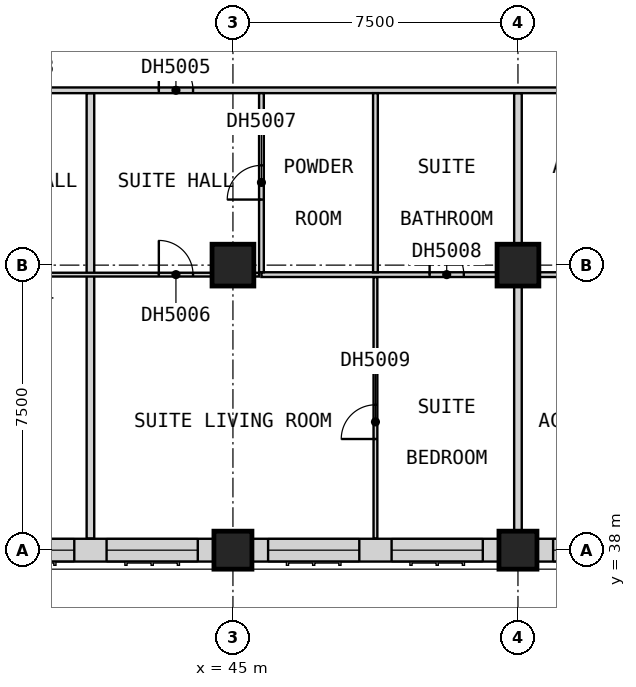
"""IFC4 building model, lengths in metres.
Left out: names, types, materials, properties, quantities, classifications, styles, units other than length and angle.
Written with IfcOpenShell. Run it as: python <this file> out.ifc"""

import sys

from ifc_helpers import new_model, si_unit, direction, frame, frame_2d, origin, origin_2d, place, context, subcontext, project, spatial, rectangle, extrude, element, fill, save


model = new_model("IFC4")
c1 = context("Model", 3, precision=1e-05, world=origin(), true_north=direction((0.0, 1.0)))
c2 = subcontext(c1, "Body", "Model", "MODEL_VIEW")
j1 = project(units=[si_unit("LENGTHUNIT", "METRE"), si_unit("PLANEANGLEUNIT", "RADIAN")], contexts=[c1])
p1 = place(None, origin())
s1 = spatial("IfcSite", under=j1, at=p1, CompositionType="ELEMENT")
p2 = place(p1, origin())
s2 = spatial("IfcBuilding", under=s1, at=p2, CompositionType="ELEMENT")
p3 = place(p2, frame((0.0, 0.0, 93.5)))
s3 = spatial("IfcBuildingStorey", under=s2, at=p3, CompositionType="ELEMENT", Elevation=93.5)
p4 = place(p3, frame((45.0, 38.0, 0.0), z_axis=(0.0, 0.0, 1.0), x_axis=(1.0, 0.0, 0.0)))
e1 = element("IfcColumn", 1, at=p4, inside=s3, PredefinedType="COLUMN", context=c2, shape_type="SweptSolid", body=[
    extrude(rectangle(XDim=1.0, YDim=1.0, at=origin_2d()), origin(), (0.0, 0.0, 1.0), 3.6),
])
p5 = place(p3, frame((45.0, 45.5, 0.0), z_axis=(0.0, 0.0, 1.0), x_axis=(1.0, 0.0, 0.0)))
e2 = element("IfcColumn", 2, at=p5, inside=s3, PredefinedType="COLUMN", context=c2, shape_type="SweptSolid", body=[
    extrude(rectangle(XDim=1.1, YDim=1.1, at=origin_2d()), origin(), (0.0, 0.0, 1.0), 3.6),
])
p6 = place(p3, frame((52.5, 38.0, 0.0), z_axis=(0.0, 0.0, 1.0), x_axis=(1.0, 0.0, 0.0)))
e3 = element("IfcColumn", 3, at=p6, inside=s3, PredefinedType="COLUMN", context=c2, shape_type="SweptSolid", body=[
    extrude(rectangle(XDim=1.0, YDim=1.0, at=origin_2d()), origin(), (0.0, 0.0, 1.0), 3.6),
])
p7 = place(p3, frame((52.5, 45.5, 0.0), z_axis=(0.0, 0.0, 1.0), x_axis=(1.0, 0.0, 0.0)))
e4 = element("IfcColumn", 4, at=p7, inside=s3, PredefinedType="COLUMN", context=c2, shape_type="SweptSolid", body=[
    extrude(rectangle(XDim=1.1, YDim=1.1, at=origin_2d()), origin(), (0.0, 0.0, 1.0), 3.6),
])
p8 = place(p3, frame((38.0, 38.0, 0.0), z_axis=(0.0, 0.0, 1.0), x_axis=(1.0, 0.0, 0.0)))
e5 = element("IfcWall", 5, at=p8, inside=s3, PredefinedType="SOLIDWALL", context=c2, shape_type="SweptSolid", body=[
    extrude(rectangle(XDim=6.5, YDim=0.6, at=frame_2d((3.25, 0.0))), origin(), (0.0, 0.0, 1.0), 2.85),
])
p9 = place(p8, frame((0.425, 0.0, 0.8)))
e6 = element("IfcOpeningElement", 6, at=p9, cuts=e5, PredefinedType="OPENING", context=c2, shape_type="SweptSolid", body=[
    extrude(rectangle(XDim=2.4, YDim=1.8, at=frame_2d((1.2, 0.9))), frame((0.0, 0.31, 0.0), z_axis=(0.0, -1.0, 0.0), x_axis=(1.0, 0.0, 0.0)), (0.0, 0.0, 1.0), 0.62),
])
p10 = place(p8, frame((3.675, 0.0, 0.8)))
e7 = element("IfcOpeningElement", 7, at=p10, cuts=e5, PredefinedType="OPENING", context=c2, shape_type="SweptSolid", body=[
    extrude(rectangle(XDim=2.4, YDim=1.8, at=frame_2d((1.2, 0.9))), frame((0.0, 0.31, 0.0), z_axis=(0.0, -1.0, 0.0), x_axis=(1.0, 0.0, 0.0)), (0.0, 0.0, 1.0), 0.62),
])
p11 = place(p3, frame((45.5, 38.0, 0.0), z_axis=(0.0, 0.0, 1.0), x_axis=(1.0, 0.0, 0.0)))
e8 = element("IfcWall", 8, at=p11, inside=s3, PredefinedType="SOLIDWALL", context=c2, shape_type="SweptSolid", body=[
    extrude(rectangle(XDim=6.5, YDim=0.6, at=frame_2d((3.25, 0.0))), origin(), (0.0, 0.0, 1.0), 2.85),
])
p12 = place(p11, frame((0.425, 0.0, 0.8)))
e9 = element("IfcOpeningElement", 9, at=p12, cuts=e8, PredefinedType="OPENING", context=c2, shape_type="SweptSolid", body=[
    extrude(rectangle(XDim=2.4, YDim=1.8, at=frame_2d((1.2, 0.9))), frame((0.0, 0.31, 0.0), z_axis=(0.0, -1.0, 0.0), x_axis=(1.0, 0.0, 0.0)), (0.0, 0.0, 1.0), 0.62),
])
p13 = place(p11, frame((3.675, 0.0, 0.8)))
e10 = element("IfcOpeningElement", 10, at=p13, cuts=e8, PredefinedType="OPENING", context=c2, shape_type="SweptSolid", body=[
    extrude(rectangle(XDim=2.4, YDim=1.8, at=frame_2d((1.2, 0.9))), frame((0.0, 0.31, 0.0), z_axis=(0.0, -1.0, 0.0), x_axis=(1.0, 0.0, 0.0)), (0.0, 0.0, 1.0), 0.62),
])
p14 = place(p3, frame((53.0, 38.0, 0.0), z_axis=(0.0, 0.0, 1.0), x_axis=(1.0, 0.0, 0.0)))
e11 = element("IfcWall", 11, at=p14, inside=s3, PredefinedType="SOLIDWALL", context=c2, shape_type="SweptSolid", body=[
    extrude(rectangle(XDim=6.5, YDim=0.6, at=frame_2d((3.25, 0.0))), origin(), (0.0, 0.0, 1.0), 2.85),
])
p15 = place(p14, frame((0.425, 0.0, 0.8)))
e12 = element("IfcOpeningElement", 12, at=p15, cuts=e11, PredefinedType="OPENING", context=c2, shape_type="SweptSolid", body=[
    extrude(rectangle(XDim=2.4, YDim=1.8, at=frame_2d((1.2, 0.9))), frame((0.0, 0.31, 0.0), z_axis=(0.0, -1.0, 0.0), x_axis=(1.0, 0.0, 0.0)), (0.0, 0.0, 1.0), 0.62),
])
p16 = place(p14, frame((3.675, 0.0, 0.8)))
e13 = element("IfcOpeningElement", 13, at=p16, cuts=e11, PredefinedType="OPENING", context=c2, shape_type="SweptSolid", body=[
    extrude(rectangle(XDim=2.4, YDim=1.8, at=frame_2d((1.2, 0.9))), frame((0.0, 0.31, 0.0), z_axis=(0.0, -1.0, 0.0), x_axis=(1.0, 0.0, 0.0)), (0.0, 0.0, 1.0), 0.62),
])
p17 = place(p3, frame((41.25, 38.31, 0.0), z_axis=(0.0, 0.0, 1.0), x_axis=(0.0, 1.0, 0.0)))
e14 = element("IfcWall", 14, at=p17, inside=s3, PredefinedType="PARTITIONING", context=c2, shape_type="SweptSolid", body=[
    extrude(rectangle(XDim=11.715, YDim=0.2, at=frame_2d((5.857, 0.0))), origin(), (0.0, 0.0, 1.0), 3.35),
])
p18 = place(p3, frame((52.5, 37.5, 0.0), z_axis=(0.0, 0.0, 1.0), x_axis=(0.0, 1.0, 0.0)))
e15 = element("IfcWall", 15, at=p18, inside=s3, PredefinedType="PARTITIONING", context=c2, shape_type="SweptSolid", body=[
    extrude(rectangle(XDim=12.525, YDim=0.2, at=frame_2d((6.262, 0.0))), origin(), (0.0, 0.0, 1.0), 3.35),
])
p19 = place(p3, frame((33.75, 50.1, 0.0), z_axis=(0.0, 0.0, 1.0), x_axis=(1.0, 0.0, 0.0)))
e16 = element("IfcWall", 16, at=p19, inside=s3, PredefinedType="PARTITIONING", context=c2, shape_type="SweptSolid", body=[
    extrude(rectangle(XDim=43.65, YDim=0.15, at=frame_2d((21.825, 0.0))), origin(), (0.0, 0.0, 1.0), 3.35),
])
p20 = place(p19, frame((5.175, 0.0, 0.0)))
e17 = element("IfcOpeningElement", 17, at=p20, cuts=e16, PredefinedType="OPENING", context=c2, shape_type="SweptSolid", body=[
    extrude(rectangle(XDim=0.9, YDim=2.1, at=frame_2d((0.45, 1.05))), frame((0.0, 0.085, 0.0), z_axis=(0.0, -1.0, 0.0), x_axis=(1.0, 0.0, 0.0)), (0.0, 0.0, 1.0), 0.17),
])
p21 = place(p19, frame((9.3, 0.0, 0.0)))
e18 = element("IfcOpeningElement", 18, at=p21, cuts=e16, PredefinedType="OPENING", context=c2, shape_type="SweptSolid", body=[
    extrude(rectangle(XDim=0.9, YDim=2.1, at=frame_2d((0.45, 1.05))), frame((0.0, 0.085, 0.0), z_axis=(0.0, -1.0, 0.0), x_axis=(1.0, 0.0, 0.0)), (0.0, 0.0, 1.0), 0.17),
])
p22 = place(p19, frame((24.438, 0.0, 0.0)))
e19 = element("IfcOpeningElement", 19, at=p22, cuts=e16, PredefinedType="OPENING", context=c2, shape_type="SweptSolid", body=[
    extrude(rectangle(XDim=1.0, YDim=2.1, at=frame_2d((0.5, 1.05))), frame((0.0, 0.085, 0.0), z_axis=(0.0, -1.0, 0.0), x_axis=(1.0, 0.0, 0.0)), (0.0, 0.0, 1.0), 0.17),
])
p23 = place(p19, frame((28.613, 0.0, 0.0)))
e20 = element("IfcOpeningElement", 20, at=p23, cuts=e16, PredefinedType="OPENING", context=c2, shape_type="SweptSolid", body=[
    extrude(rectangle(XDim=0.9, YDim=2.1, at=frame_2d((0.45, 1.05))), frame((0.0, 0.085, 0.0), z_axis=(0.0, -1.0, 0.0), x_axis=(1.0, 0.0, 0.0)), (0.0, 0.0, 1.0), 0.17),
])
p24 = place(p19, frame((31.8, 0.0, 0.0)))
e21 = element("IfcOpeningElement", 21, at=p24, cuts=e16, PredefinedType="OPENING", context=c2, shape_type="SweptSolid", body=[
    extrude(rectangle(XDim=0.9, YDim=2.1, at=frame_2d((0.45, 1.05))), frame((0.0, 0.085, 0.0), z_axis=(0.0, -1.0, 0.0), x_axis=(1.0, 0.0, 0.0)), (0.0, 0.0, 1.0), 0.17),
])
p25 = place(p19, frame((42.0, 0.0, 0.0)))
e22 = element("IfcOpeningElement", 22, at=p25, cuts=e16, PredefinedType="OPENING", context=c2, shape_type="SweptSolid", body=[
    extrude(rectangle(XDim=0.9, YDim=2.1, at=frame_2d((0.45, 1.05))), frame((0.0, 0.085, 0.0), z_axis=(0.0, -1.0, 0.0), x_axis=(1.0, 0.0, 0.0)), (0.0, 0.0, 1.0), 0.17),
])
p26 = place(p3, frame((33.812, 45.25, 0.0), z_axis=(0.0, 0.0, 1.0), x_axis=(1.0, 0.0, 0.0)))
e23 = element("IfcWall", 23, at=p26, inside=s3, PredefinedType="PARTITIONING", context=c2, shape_type="SweptSolid", body=[
    extrude(rectangle(XDim=11.875, YDim=0.1, at=frame_2d((5.938, 0.0))), origin(), (0.0, 0.0, 1.0), 3.35),
])
p27 = place(p26, frame((5.113, 0.0, 0.0)))
e24 = element("IfcOpeningElement", 24, at=p27, cuts=e23, PredefinedType="OPENING", context=c2, shape_type="SweptSolid", body=[
    extrude(rectangle(XDim=0.9, YDim=2.1, at=frame_2d((0.45, 1.05))), frame((0.0, 0.06, 0.0), z_axis=(0.0, -1.0, 0.0), x_axis=(1.0, 0.0, 0.0)), (0.0, 0.0, 1.0), 0.12),
])
p28 = place(p26, frame((9.238, 0.0, 0.0)))
e25 = element("IfcOpeningElement", 25, at=p28, cuts=e23, PredefinedType="OPENING", context=c2, shape_type="SweptSolid", body=[
    extrude(rectangle(XDim=0.9, YDim=2.1, at=frame_2d((0.45, 1.05))), frame((0.0, 0.06, 0.0), z_axis=(0.0, -1.0, 0.0), x_axis=(1.0, 0.0, 0.0)), (0.0, 0.0, 1.0), 0.12),
])
p29 = place(p3, frame((48.75, 38.31, 0.0), z_axis=(0.0, 0.0, 1.0), x_axis=(0.0, 1.0, 0.0)))
e26 = element("IfcWall", 26, at=p29, inside=s3, PredefinedType="PARTITIONING", context=c2, shape_type="SweptSolid", body=[
    extrude(rectangle(XDim=6.877, YDim=0.1, at=frame_2d((3.439, 0.0))), origin(), (0.0, 0.0, 1.0), 3.35),
])
p30 = place(p29, frame((2.615, 0.0, 0.0)))
e27 = element("IfcOpeningElement", 27, at=p30, cuts=e26, PredefinedType="OPENING", context=c2, shape_type="SweptSolid", body=[
    extrude(rectangle(XDim=0.9, YDim=2.1, at=frame_2d((0.45, 1.05))), frame((0.0, 0.06, 0.0), z_axis=(0.0, -1.0, 0.0), x_axis=(1.0, 0.0, 0.0)), (0.0, 0.0, 1.0), 0.12),
])
p31 = place(p3, frame((45.75, 45.25, 0.0), z_axis=(0.0, 0.0, 1.0), x_axis=(1.0, 0.0, 0.0)))
e28 = element("IfcWall", 28, at=p31, inside=s3, PredefinedType="PARTITIONING", context=c2, shape_type="SweptSolid", body=[
    extrude(rectangle(XDim=11.625, YDim=0.125, at=frame_2d((5.812, 0.0))), origin(), (0.0, 0.0, 1.0), 3.35),
])
p32 = place(p31, frame((4.425, 0.0, 0.0)))
e29 = element("IfcOpeningElement", 29, at=p32, cuts=e28, PredefinedType="OPENING", context=c2, shape_type="SweptSolid", body=[
    extrude(rectangle(XDim=0.9, YDim=2.1, at=frame_2d((0.45, 1.05))), frame((0.0, 0.073, 0.0), z_axis=(0.0, -1.0, 0.0), x_axis=(1.0, 0.0, 0.0)), (0.0, 0.0, 1.0), 0.145),
])
p33 = place(p31, frame((8.688, 0.0, 0.0)))
e30 = element("IfcOpeningElement", 30, at=p33, cuts=e28, PredefinedType="OPENING", context=c2, shape_type="SweptSolid", body=[
    extrude(rectangle(XDim=1.0, YDim=2.1, at=frame_2d((0.5, 1.05))), frame((0.0, 0.073, 0.0), z_axis=(0.0, -1.0, 0.0), x_axis=(1.0, 0.0, 0.0)), (0.0, 0.0, 1.0), 0.145),
])
p34 = place(p3, frame((45.75, 45.312, 0.0), z_axis=(0.0, 0.0, 1.0), x_axis=(0.0, 1.0, 0.0)))
e31 = element("IfcWall", 31, at=p34, inside=s3, PredefinedType="PARTITIONING", context=c2, shape_type="SweptSolid", body=[
    extrude(rectangle(XDim=4.712, YDim=0.125, at=frame_2d((2.356, 0.0))), origin(), (0.0, 0.0, 1.0), 3.35),
])
p35 = place(p34, frame((1.913, 0.0, 0.0)))
e32 = element("IfcOpeningElement", 32, at=p35, cuts=e31, PredefinedType="OPENING", context=c2, shape_type="SweptSolid", body=[
    extrude(rectangle(XDim=0.9, YDim=2.1, at=frame_2d((0.45, 1.05))), frame((0.0, 0.073, 0.0), z_axis=(0.0, -1.0, 0.0), x_axis=(1.0, 0.0, 0.0)), (0.0, 0.0, 1.0), 0.145),
])
p36 = place(p3, frame((48.75, 45.312, 0.0), z_axis=(0.0, 0.0, 1.0), x_axis=(0.0, 1.0, 0.0)))
e33 = element("IfcWall", 33, at=p36, inside=s3, PredefinedType="PARTITIONING", context=c2, shape_type="SweptSolid", body=[
    extrude(rectangle(XDim=4.712, YDim=0.125, at=frame_2d((2.356, 0.0))), origin(), (0.0, 0.0, 1.0), 3.35),
])
p37 = place(p9, origin())
e34 = element("IfcWindow", 34, at=p37, inside=s3, PartitioningType="SINGLE_PANEL", PredefinedType="WINDOW", context=c2, shape_type="SweptSolid", body=[
    extrude(rectangle(XDim=2.4, YDim=1.8, at=frame_2d((1.2, 0.9))), frame((0.0, -0.07, 0.0), z_axis=(0.0, -1.0, 0.0), x_axis=(1.0, 0.0, 0.0)), (0.0, 0.0, 1.0), 0.06),
])
fill(e6, e34)
p38 = place(p10, origin())
e35 = element("IfcWindow", 35, at=p38, inside=s3, PartitioningType="SINGLE_PANEL", PredefinedType="WINDOW", context=c2, shape_type="SweptSolid", body=[
    extrude(rectangle(XDim=2.4, YDim=1.8, at=frame_2d((1.2, 0.9))), frame((0.0, -0.07, 0.0), z_axis=(0.0, -1.0, 0.0), x_axis=(1.0, 0.0, 0.0)), (0.0, 0.0, 1.0), 0.06),
])
fill(e7, e35)
p39 = place(p12, origin())
e36 = element("IfcWindow", 36, at=p39, inside=s3, PartitioningType="SINGLE_PANEL", PredefinedType="WINDOW", context=c2, shape_type="SweptSolid", body=[
    extrude(rectangle(XDim=2.4, YDim=1.8, at=frame_2d((1.2, 0.9))), frame((0.0, -0.07, 0.0), z_axis=(0.0, -1.0, 0.0), x_axis=(1.0, 0.0, 0.0)), (0.0, 0.0, 1.0), 0.06),
])
fill(e9, e36)
p40 = place(p13, origin())
e37 = element("IfcWindow", 37, at=p40, inside=s3, PartitioningType="SINGLE_PANEL", PredefinedType="WINDOW", context=c2, shape_type="SweptSolid", body=[
    extrude(rectangle(XDim=2.4, YDim=1.8, at=frame_2d((1.2, 0.9))), frame((0.0, -0.07, 0.0), z_axis=(0.0, -1.0, 0.0), x_axis=(1.0, 0.0, 0.0)), (0.0, 0.0, 1.0), 0.06),
])
fill(e10, e37)
p41 = place(p15, origin())
e38 = element("IfcWindow", 38, at=p41, inside=s3, PartitioningType="SINGLE_PANEL", PredefinedType="WINDOW", context=c2, shape_type="SweptSolid", body=[
    extrude(rectangle(XDim=2.4, YDim=1.8, at=frame_2d((1.2, 0.9))), frame((0.0, -0.07, 0.0), z_axis=(0.0, -1.0, 0.0), x_axis=(1.0, 0.0, 0.0)), (0.0, 0.0, 1.0), 0.06),
])
fill(e12, e38)
p42 = place(p21, origin())
e39 = element("IfcDoor", 39, at=p42, inside=s3, OperationType="SINGLE_SWING_RIGHT", PredefinedType="DOOR", context=c2, shape_type="SweptSolid", body=[
    extrude(rectangle(XDim=0.9, YDim=2.1, at=frame_2d((0.45, 1.05))), frame((0.0, 0.025, 0.0), z_axis=(0.0, -1.0, 0.0), x_axis=(1.0, 0.0, 0.0)), (0.0, 0.0, 1.0), 0.05),
])
fill(e18, e39)
p43 = place(p28, origin())
e40 = element("IfcDoor", 40, at=p43, inside=s3, OperationType="SINGLE_SWING_LEFT", PredefinedType="DOOR", context=c2, shape_type="SweptSolid", body=[
    extrude(rectangle(XDim=0.9, YDim=2.1, at=frame_2d((0.45, 1.05))), frame((0.0, 0.025, 0.0), z_axis=(0.0, -1.0, 0.0), x_axis=(1.0, 0.0, 0.0)), (0.0, 0.0, 1.0), 0.05),
])
fill(e25, e40)
p44 = place(p35, origin())
e41 = element("IfcDoor", 41, at=p44, inside=s3, OperationType="SINGLE_SWING_LEFT", PredefinedType="DOOR", context=c2, shape_type="SweptSolid", body=[
    extrude(rectangle(XDim=0.9, YDim=2.1, at=frame_2d((0.45, 1.05))), frame((0.0, 0.025, 0.0), z_axis=(0.0, -1.0, 0.0), x_axis=(1.0, 0.0, 0.0)), (0.0, 0.0, 1.0), 0.05),
])
fill(e32, e41)
p45 = place(p32, origin())
e42 = element("IfcDoor", 42, at=p45, inside=s3, OperationType="SINGLE_SWING_LEFT", PredefinedType="DOOR", context=c2, shape_type="SweptSolid", body=[
    extrude(rectangle(XDim=0.9, YDim=2.1, at=frame_2d((0.45, 1.05))), frame((0.0, 0.025, 0.0), z_axis=(0.0, -1.0, 0.0), x_axis=(1.0, 0.0, 0.0)), (0.0, 0.0, 1.0), 0.05),
])
fill(e29, e42)
p46 = place(p30, origin())
e43 = element("IfcDoor", 43, at=p46, inside=s3, OperationType="SINGLE_SWING_LEFT", PredefinedType="DOOR", context=c2, shape_type="SweptSolid", body=[
    extrude(rectangle(XDim=0.9, YDim=2.1, at=frame_2d((0.45, 1.05))), frame((0.0, 0.025, 0.0), z_axis=(0.0, -1.0, 0.0), x_axis=(1.0, 0.0, 0.0)), (0.0, 0.0, 1.0), 0.05),
])
fill(e27, e43)
save(model, sys.argv[1])
